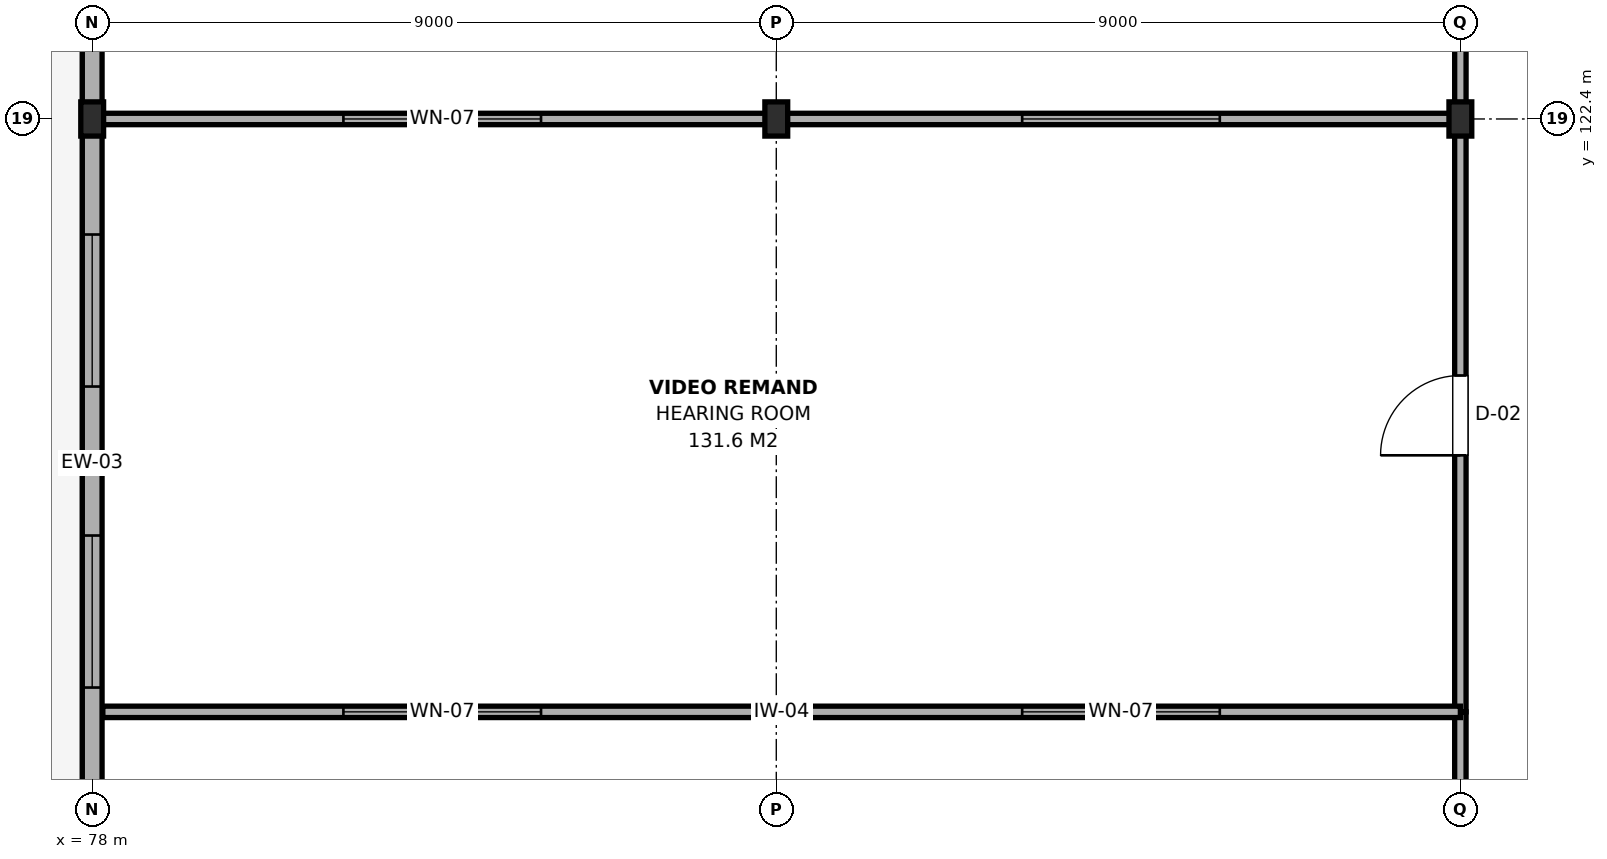
"""IFC4 building model, lengths in metres.
Left out: names, types, materials, properties, quantities, classifications, styles, units other than length and angle.
Written with IfcOpenShell. Run it as: python <this file> out.ifc"""

import sys

from ifc_helpers import new_model, si_unit, direction, frame, frame_2d, origin, origin_2d, place, context, subcontext, project, spatial, rectangle, i_section, extrude, element, fill, save


model = new_model("IFC4")
c1 = context("Model", 3, precision=1e-05, world=origin(), true_north=direction((0.0, 1.0)))
c2 = subcontext(c1, "Body", "Model", "MODEL_VIEW")
j1 = project(units=[si_unit("LENGTHUNIT", "METRE"), si_unit("PLANEANGLEUNIT", "RADIAN")], contexts=[c1])
p1 = place(None, origin())
s1 = spatial("IfcSite", under=j1, at=p1, CompositionType="ELEMENT")
p2 = place(p1, origin())
s2 = spatial("IfcBuilding", under=s1, at=p2, CompositionType="ELEMENT")
p3 = place(p2, frame((0.0, 0.0, 9.0)))
s3 = spatial("IfcBuildingStorey", under=s2, at=p3, CompositionType="ELEMENT", Elevation=9.0)
for number, where, z_axis, x_axis in (
    (1, (78.0, 122.4, 0.0), (0.0, 0.0, 1.0), (1.0, 0.0, 0.0)),
    (2, (87.0, 122.4, 0.0), (0.0, 0.0, 1.0), (1.0, 0.0, 0.0)),
    (3, (96.0, 122.4, 0.0), (0.0, 0.0, 1.0), (1.0, 0.0, 0.0)),
):
    element("IfcColumn", number, at=place(p3, frame(where, z_axis=z_axis, x_axis=x_axis)), inside=s3, PredefinedType="COLUMN", context=c2, shape_type="SweptSolid", body=[
        extrude(i_section(OverallWidth=0.3, OverallDepth=0.45, WebThickness=0.014, FlangeThickness=0.026, FilletRadius=0.027, at=origin_2d()), origin(), (0.0, 0.0, 1.0), 4.2),
    ])
p4 = place(p3, frame((78.0, 113.4, 0.0), z_axis=(0.0, 0.0, 1.0), x_axis=(0.0, 1.0, 0.0)))
e4 = element("IfcWall", 4, at=p4, inside=s3, PredefinedType="SOLIDWALL", context=c2, shape_type="SweptSolid", body=[
    extrude(rectangle(XDim=9.0, YDim=0.26, at=frame_2d((4.5, 0.0))), origin(), (0.0, 0.0, 1.0), 3.535),
])
p5 = place(p4, frame((1.52, 0.0, 1.05)))
e5 = element("IfcOpeningElement", 5, at=p5, cuts=e4, PredefinedType="OPENING", context=c2, shape_type="SweptSolid", body=[
    extrude(rectangle(XDim=2.0, YDim=1.8, at=frame_2d((1.0, 0.9))), frame((0.0, 0.145, 0.0), z_axis=(0.0, -1.0, 0.0), x_axis=(1.0, 0.0, 0.0)), (0.0, 0.0, 1.0), 0.29),
])
p6 = place(p4, frame((5.48, 0.0, 1.05)))
e6 = element("IfcOpeningElement", 6, at=p6, cuts=e4, PredefinedType="OPENING", context=c2, shape_type="SweptSolid", body=[
    extrude(rectangle(XDim=2.0, YDim=1.8, at=frame_2d((1.0, 0.9))), frame((0.0, 0.145, 0.0), z_axis=(0.0, -1.0, 0.0), x_axis=(1.0, 0.0, 0.0)), (0.0, 0.0, 1.0), 0.29),
])
p7 = place(p3, frame((78.0, 122.4, 0.0), z_axis=(0.0, 0.0, 1.0), x_axis=(0.0, 1.0, 0.0)))
e7 = element("IfcWall", 7, at=p7, inside=s3, PredefinedType="SOLIDWALL", context=c2, shape_type="SweptSolid", body=[
    extrude(rectangle(XDim=8.4, YDim=0.26, at=frame_2d((4.2, 0.0))), origin(), (0.0, 0.0, 1.0), 3.585),
])
p8 = place(p7, frame((1.352, 0.0, 1.05)))
e8 = element("IfcOpeningElement", 8, at=p8, cuts=e7, PredefinedType="OPENING", context=c2, shape_type="SweptSolid", body=[
    extrude(rectangle(XDim=2.0, YDim=1.8, at=frame_2d((1.0, 0.9))), frame((0.0, 0.145, 0.0), z_axis=(0.0, -1.0, 0.0), x_axis=(1.0, 0.0, 0.0)), (0.0, 0.0, 1.0), 0.29),
])
p9 = place(p7, frame((5.048, 0.0, 1.05)))
e9 = element("IfcOpeningElement", 9, at=p9, cuts=e7, PredefinedType="OPENING", context=c2, shape_type="SweptSolid", body=[
    extrude(rectangle(XDim=2.0, YDim=1.8, at=frame_2d((1.0, 0.9))), frame((0.0, 0.145, 0.0), z_axis=(0.0, -1.0, 0.0), x_axis=(1.0, 0.0, 0.0)), (0.0, 0.0, 1.0), 0.29),
])
p10 = place(p3, frame((96.0, 104.6, 0.0), z_axis=(0.0, 0.0, 1.0), x_axis=(0.0, 1.0, 0.0)))
e10 = element("IfcWall", 10, at=p10, inside=s3, PredefinedType="PARTITIONING", context=c2, shape_type="SweptSolid", body=[
    extrude(rectangle(XDim=10.0, YDim=0.15, at=frame_2d((5.0, 0.0))), origin(), (0.0, 0.0, 1.0), 3.485),
])
p11 = place(p10, frame((4.25, 0.0, 0.0)))
e11 = element("IfcOpeningElement", 11, at=p11, cuts=e10, PredefinedType="OPENING", context=c2, shape_type="SweptSolid", body=[
    extrude(rectangle(XDim=1.5, YDim=2.15, at=frame_2d((0.75, 1.075))), frame((0.0, 0.09, 0.0), z_axis=(0.0, -1.0, 0.0), x_axis=(1.0, 0.0, 0.0)), (0.0, 0.0, 1.0), 0.18),
])
p12 = place(p3, frame((96.0, 114.6, 0.0), z_axis=(0.0, 0.0, 1.0), x_axis=(0.0, 1.0, 0.0)))
e12 = element("IfcWall", 12, at=p12, inside=s3, PredefinedType="PARTITIONING", context=c2, shape_type="SweptSolid", body=[
    extrude(rectangle(XDim=7.8, YDim=0.15, at=frame_2d((3.9, 0.0))), origin(), (0.0, 0.0, 1.0), 3.385),
])
p13 = place(p12, frame((3.375, 0.0, 0.0)))
e13 = element("IfcOpeningElement", 13, at=p13, cuts=e12, PredefinedType="OPENING", context=c2, shape_type="SweptSolid", body=[
    extrude(rectangle(XDim=1.05, YDim=2.15, at=frame_2d((0.525, 1.075))), frame((0.0, 0.09, 0.0), z_axis=(0.0, -1.0, 0.0), x_axis=(1.0, 0.0, 0.0)), (0.0, 0.0, 1.0), 0.18),
])
p14 = place(p3, frame((78.14, 114.6, 0.0), z_axis=(0.0, 0.0, 1.0), x_axis=(1.0, 0.0, 0.0)))
e14 = element("IfcWall", 14, at=p14, inside=s3, PredefinedType="PARTITIONING", context=c2, shape_type="SweptSolid", body=[
    extrude(rectangle(XDim=17.86, YDim=0.15, at=frame_2d((8.93, 0.0))), origin(), (0.0, 0.0, 1.0), 3.435),
])
p15 = place(p14, frame((3.165, 0.0, 0.95)))
e15 = element("IfcOpeningElement", 15, at=p15, cuts=e14, PredefinedType="OPENING", context=c2, shape_type="SweptSolid", body=[
    extrude(rectangle(XDim=2.6, YDim=1.5, at=frame_2d((1.3, 0.75))), frame((0.0, 0.09, 0.0), z_axis=(0.0, -1.0, 0.0), x_axis=(1.0, 0.0, 0.0)), (0.0, 0.0, 1.0), 0.18),
])
p16 = place(p14, frame((12.095, 0.0, 0.95)))
e16 = element("IfcOpeningElement", 16, at=p16, cuts=e14, PredefinedType="OPENING", context=c2, shape_type="SweptSolid", body=[
    extrude(rectangle(XDim=2.6, YDim=1.5, at=frame_2d((1.3, 0.75))), frame((0.0, 0.09, 0.0), z_axis=(0.0, -1.0, 0.0), x_axis=(1.0, 0.0, 0.0)), (0.0, 0.0, 1.0), 0.18),
])
p17 = place(p3, frame((96.0, 122.4, 0.0), z_axis=(0.0, 0.0, 1.0), x_axis=(0.0, 1.0, 0.0)))
e17 = element("IfcWall", 17, at=p17, inside=s3, PredefinedType="PARTITIONING", context=c2, shape_type="SweptSolid", body=[
    extrude(rectangle(XDim=22.8, YDim=0.15, at=frame_2d((11.4, 0.0))), origin(), (0.0, 0.0, 1.0), 3.375),
])
p18 = place(p17, frame((10.65, 0.0, 0.0)))
e18 = element("IfcOpeningElement", 18, at=p18, cuts=e17, PredefinedType="OPENING", context=c2, shape_type="SweptSolid", body=[
    extrude(rectangle(XDim=1.5, YDim=2.15, at=frame_2d((0.75, 1.075))), frame((0.0, 0.09, 0.0), z_axis=(0.0, -1.0, 0.0), x_axis=(1.0, 0.0, 0.0)), (0.0, 0.0, 1.0), 0.18),
])
p19 = place(p17, frame((4.4, 0.0, 0.95)))
e19 = element("IfcOpeningElement", 19, at=p19, cuts=e17, PredefinedType="OPENING", context=c2, shape_type="SweptSolid", body=[
    extrude(rectangle(XDim=2.6, YDim=1.5, at=frame_2d((1.3, 0.75))), frame((0.0, 0.09, 0.0), z_axis=(0.0, -1.0, 0.0), x_axis=(1.0, 0.0, 0.0)), (0.0, 0.0, 1.0), 0.18),
])
p20 = place(p3, frame((78.14, 122.4, 0.0), z_axis=(0.0, 0.0, 1.0), x_axis=(1.0, 0.0, 0.0)))
e20 = element("IfcWall", 20, at=p20, inside=s3, PredefinedType="PARTITIONING", context=c2, shape_type="SweptSolid", body=[
    extrude(rectangle(XDim=17.86, YDim=0.15, at=frame_2d((8.93, 0.0))), origin(), (0.0, 0.0, 1.0), 3.385),
])
p21 = place(p20, frame((3.165, 0.0, 0.95)))
e21 = element("IfcOpeningElement", 21, at=p21, cuts=e20, PredefinedType="OPENING", context=c2, shape_type="SweptSolid", body=[
    extrude(rectangle(XDim=2.6, YDim=1.5, at=frame_2d((1.3, 0.75))), frame((0.0, 0.09, 0.0), z_axis=(0.0, -1.0, 0.0), x_axis=(1.0, 0.0, 0.0)), (0.0, 0.0, 1.0), 0.18),
])
p22 = place(p20, frame((12.095, 0.0, 0.95)))
e22 = element("IfcOpeningElement", 22, at=p22, cuts=e20, PredefinedType="OPENING", context=c2, shape_type="SweptSolid", body=[
    extrude(rectangle(XDim=2.6, YDim=1.5, at=frame_2d((1.3, 0.75))), frame((0.0, 0.09, 0.0), z_axis=(0.0, -1.0, 0.0), x_axis=(1.0, 0.0, 0.0)), (0.0, 0.0, 1.0), 0.18),
])
p23 = place(p5, origin())
e23 = element("IfcWindow", 23, at=p23, inside=s3, PartitioningType="SINGLE_PANEL", PredefinedType="WINDOW", context=c2, shape_type="SweptSolid", body=[
    extrude(rectangle(XDim=2.0, YDim=1.8, at=frame_2d((1.0, 0.9))), frame((0.0, 0.03, 0.0), z_axis=(0.0, -1.0, 0.0), x_axis=(1.0, 0.0, 0.0)), (0.0, 0.0, 1.0), 0.06),
])
fill(e5, e23)
p24 = place(p6, origin())
e24 = element("IfcWindow", 24, at=p24, inside=s3, PartitioningType="SINGLE_PANEL", PredefinedType="WINDOW", context=c2, shape_type="SweptSolid", body=[
    extrude(rectangle(XDim=2.0, YDim=1.8, at=frame_2d((1.0, 0.9))), frame((0.0, 0.03, 0.0), z_axis=(0.0, -1.0, 0.0), x_axis=(1.0, 0.0, 0.0)), (0.0, 0.0, 1.0), 0.06),
])
fill(e6, e24)
p25 = place(p13, origin())
e25 = element("IfcDoor", 25, at=p25, inside=s3, OperationType="SINGLE_SWING_LEFT", PredefinedType="DOOR", context=c2, shape_type="SweptSolid", body=[
    extrude(rectangle(XDim=1.05, YDim=2.15, at=frame_2d((0.525, 1.075))), frame((0.0, 0.025, 0.0), z_axis=(0.0, -1.0, 0.0), x_axis=(1.0, 0.0, 0.0)), (0.0, 0.0, 1.0), 0.05),
])
fill(e13, e25)
p26 = place(p15, origin())
e26 = element("IfcWindow", 26, at=p26, inside=s3, PartitioningType="SINGLE_PANEL", PredefinedType="WINDOW", context=c2, shape_type="SweptSolid", body=[
    extrude(rectangle(XDim=2.6, YDim=1.5, at=frame_2d((1.3, 0.75))), frame((0.0, 0.03, 0.0), z_axis=(0.0, -1.0, 0.0), x_axis=(1.0, 0.0, 0.0)), (0.0, 0.0, 1.0), 0.06),
])
fill(e15, e26)
p27 = place(p16, origin())
e27 = element("IfcWindow", 27, at=p27, inside=s3, PartitioningType="SINGLE_PANEL", PredefinedType="WINDOW", context=c2, shape_type="SweptSolid", body=[
    extrude(rectangle(XDim=2.6, YDim=1.5, at=frame_2d((1.3, 0.75))), frame((0.0, 0.03, 0.0), z_axis=(0.0, -1.0, 0.0), x_axis=(1.0, 0.0, 0.0)), (0.0, 0.0, 1.0), 0.06),
])
fill(e16, e27)
p28 = place(p21, origin())
e28 = element("IfcWindow", 28, at=p28, inside=s3, PartitioningType="SINGLE_PANEL", PredefinedType="WINDOW", context=c2, shape_type="SweptSolid", body=[
    extrude(rectangle(XDim=2.6, YDim=1.5, at=frame_2d((1.3, 0.75))), frame((0.0, 0.03, 0.0), z_axis=(0.0, -1.0, 0.0), x_axis=(1.0, 0.0, 0.0)), (0.0, 0.0, 1.0), 0.06),
])
fill(e21, e28)
p29 = place(p22, origin())
e29 = element("IfcWindow", 29, at=p29, inside=s3, PartitioningType="SINGLE_PANEL", PredefinedType="WINDOW", context=c2, shape_type="SweptSolid", body=[
    extrude(rectangle(XDim=2.6, YDim=1.5, at=frame_2d((1.3, 0.75))), frame((0.0, 0.03, 0.0), z_axis=(0.0, -1.0, 0.0), x_axis=(1.0, 0.0, 0.0)), (0.0, 0.0, 1.0), 0.06),
])
fill(e22, e29)
save(model, sys.argv[1])
